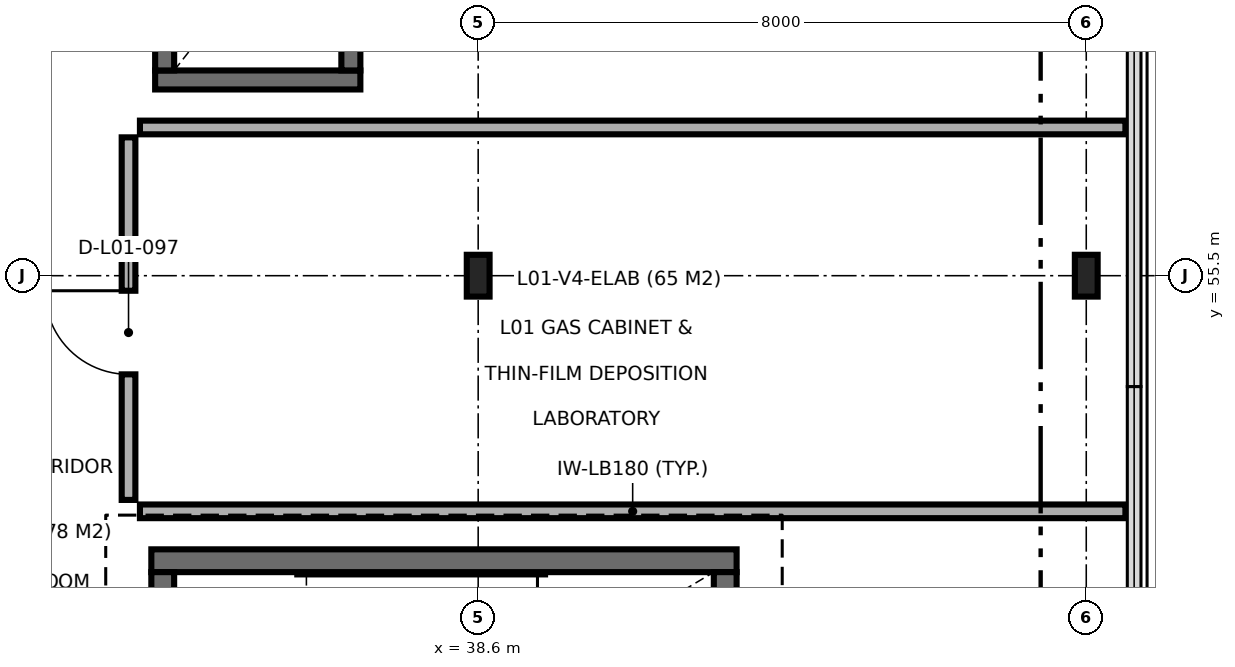
"""IFC4 building model, lengths in metres.
Left out: names, types, materials, properties, quantities, classifications, styles, units other than length and angle.
Written with IfcOpenShell. Run it as: python <this file> out.ifc"""

import sys

from ifc_helpers import new_model, si_unit, direction, frame, frame_2d, origin, origin_2d, place, context, subcontext, project, spatial, rectangle, i_section, extrude, element, fill, save


model = new_model("IFC4")
c1 = context("Model", 3, precision=1e-05, world=origin(), true_north=direction((0.0, 1.0)))
c2 = subcontext(c1, "Body", "Model", "MODEL_VIEW")
j1 = project(units=[si_unit("LENGTHUNIT", "METRE"), si_unit("PLANEANGLEUNIT", "RADIAN")], contexts=[c1])
p1 = place(None, origin())
s1 = spatial("IfcSite", under=j1, at=p1, CompositionType="ELEMENT")
p2 = place(p1, origin())
s2 = spatial("IfcBuilding", under=s1, at=p2, CompositionType="ELEMENT")
p3 = place(p2, frame((0.0, 0.0, 4.8)))
s3 = spatial("IfcBuildingStorey", under=s2, at=p3, CompositionType="ELEMENT", Elevation=4.8)
for number, where, z_axis, x_axis in (
    (1, (38.6, 55.5, 0.0), (0.0, 0.0, 1.0), (1.0, 0.0, 0.0)),
    (2, (46.6, 55.5, 0.0), (0.0, 0.0, 1.0), (1.0, 0.0, 0.0)),
):
    element("IfcColumn", number, at=place(p3, frame(where, z_axis=z_axis, x_axis=x_axis)), inside=s3, PredefinedType="COLUMN", context=c2, shape_type="SweptSolid", body=[
        extrude(i_section(OverallWidth=0.3, OverallDepth=0.55, WebThickness=0.015, FlangeThickness=0.029, FilletRadius=0.027, at=origin_2d()), origin(), (0.0, 0.0, 1.0), 4.5),
    ])
p4 = place(p3, frame((42.0, 51.75, 0.0), z_axis=(0.0, 0.0, 1.0), x_axis=(-1.0, 0.0, 0.0)))
e3 = element("IfcWall", 3, at=p4, inside=s3, PredefinedType="SHEAR", context=c2, shape_type="SweptSolid", body=[
    extrude(rectangle(XDim=7.7, YDim=0.3, at=frame_2d((3.85, 0.0))), origin(), (0.0, 0.0, 1.0), 4.5),
])
p5 = place(p3, frame((34.45, 51.6, 0.0), z_axis=(0.0, 0.0, 1.0), x_axis=(0.0, -1.0, 0.0)))
e4 = element("IfcWall", 4, at=p5, inside=s3, PredefinedType="SHEAR", context=c2, shape_type="SweptSolid", body=[
    extrude(rectangle(XDim=3.2, YDim=0.3, at=frame_2d((1.6, 0.0))), origin(), (0.0, 0.0, 1.0), 4.5),
])
p6 = place(p5, frame((1.0, 0.0, 0.0)))
e5 = element("IfcOpeningElement", 5, at=p6, cuts=e4, PredefinedType="OPENING", context=c2, shape_type="SweptSolid", body=[
    extrude(rectangle(XDim=1.2, YDim=2.15, at=frame_2d((0.6, 1.075))), frame((0.0, 0.16, 0.0), z_axis=(0.0, -1.0, 0.0), x_axis=(1.0, 0.0, 0.0)), (0.0, 0.0, 1.0), 0.32),
])
p7 = place(p3, frame((41.85, 48.4, 0.0), z_axis=(0.0, 0.0, 1.0), x_axis=(0.0, 1.0, 0.0)))
e6 = element("IfcWall", 6, at=p7, inside=s3, PredefinedType="SHEAR", context=c2, shape_type="SweptSolid", body=[
    extrude(rectangle(XDim=3.2, YDim=0.3, at=frame_2d((1.6, 0.0))), origin(), (0.0, 0.0, 1.0), 4.5),
])
p8 = place(p3, frame((34.35, 58.075, 0.0), z_axis=(0.0, 0.0, 1.0), x_axis=(1.0, 0.0, 0.0)))
e7 = element("IfcWall", 7, at=p8, inside=s3, PredefinedType="SHEAR", context=c2, shape_type="SweptSolid", body=[
    extrude(rectangle(XDim=2.7, YDim=0.25, at=frame_2d((1.35, 0.0))), origin(), (0.0, 0.0, 1.0), 4.5),
])
p9 = place(p3, frame((34.475, 61.0, 0.0), z_axis=(0.0, 0.0, 1.0), x_axis=(0.0, -1.0, 0.0)))
e8 = element("IfcWall", 8, at=p9, inside=s3, PredefinedType="SHEAR", context=c2, shape_type="SweptSolid", body=[
    extrude(rectangle(XDim=2.8, YDim=0.25, at=frame_2d((1.4, 0.0))), origin(), (0.0, 0.0, 1.0), 4.5),
])
p10 = place(p9, frame((0.85, 0.0, 0.0)))
e9 = element("IfcOpeningElement", 9, at=p10, cuts=e8, PredefinedType="OPENING", context=c2, shape_type="SweptSolid", body=[
    extrude(rectangle(XDim=1.1, YDim=2.15, at=frame_2d((0.55, 1.075))), frame((0.0, 0.135, 0.0), z_axis=(0.0, -1.0, 0.0), x_axis=(1.0, 0.0, 0.0)), (0.0, 0.0, 1.0), 0.27),
])
p11 = place(p3, frame((36.925, 58.2, 0.0), z_axis=(0.0, 0.0, 1.0), x_axis=(0.0, 1.0, 0.0)))
e10 = element("IfcWall", 10, at=p11, inside=s3, PredefinedType="SHEAR", context=c2, shape_type="SweptSolid", body=[
    extrude(rectangle(XDim=2.8, YDim=0.25, at=frame_2d((1.4, 0.0))), origin(), (0.0, 0.0, 1.0), 4.5),
])
for number, where, z_axis, x_axis in (
    (11, (34.15, 52.4, 0.0), (0.0, 0.0, 1.0), (1.0, 0.0, 0.0)),
    (12, (34.15, 57.45, 0.0), (0.0, 0.0, 1.0), (1.0, 0.0, 0.0)),
):
    element("IfcWall", number, at=place(p3, frame(where, z_axis=z_axis, x_axis=x_axis)), inside=s3, PredefinedType="PARTITIONING", context=c2, shape_type="SweptSolid", body=[
        extrude(rectangle(XDim=12.965, YDim=0.18, at=frame_2d((6.482, 0.0))), origin(), (0.0, 0.0, 1.0), 4.25),
    ])
p12 = place(p3, frame((34.0, 52.55, 0.0), z_axis=(0.0, 0.0, 1.0), x_axis=(0.0, 1.0, 0.0)))
e13 = element("IfcWall", 13, at=p12, inside=s3, PredefinedType="PARTITIONING", context=c2, shape_type="SweptSolid", body=[
    extrude(rectangle(XDim=4.77, YDim=0.18, at=frame_2d((2.385, 0.0))), origin(), (0.0, 0.0, 1.0), 4.25),
])
p13 = place(p12, frame((1.652, 0.0, 0.0)))
e14 = element("IfcOpeningElement", 14, at=p13, cuts=e13, PredefinedType="OPENING", context=c2, shape_type="SweptSolid", body=[
    extrude(rectangle(XDim=1.1, YDim=2.15, at=frame_2d((0.55, 1.075))), frame((0.0, 0.1, 0.0), z_axis=(0.0, -1.0, 0.0), x_axis=(1.0, 0.0, 0.0)), (0.0, 0.0, 1.0), 0.2),
])
p14 = place(p13, origin())
e15 = element("IfcDoor", 15, at=p14, inside=s3, OperationType="SINGLE_SWING_RIGHT", PredefinedType="DOOR", context=c2, shape_type="SweptSolid", body=[
    extrude(rectangle(XDim=1.1, YDim=2.15, at=frame_2d((0.55, 1.075))), frame((0.0, 0.025, 0.0), z_axis=(0.0, -1.0, 0.0), x_axis=(1.0, 0.0, 0.0)), (0.0, 0.0, 1.0), 0.05),
])
fill(e14, e15)
save(model, sys.argv[1])
